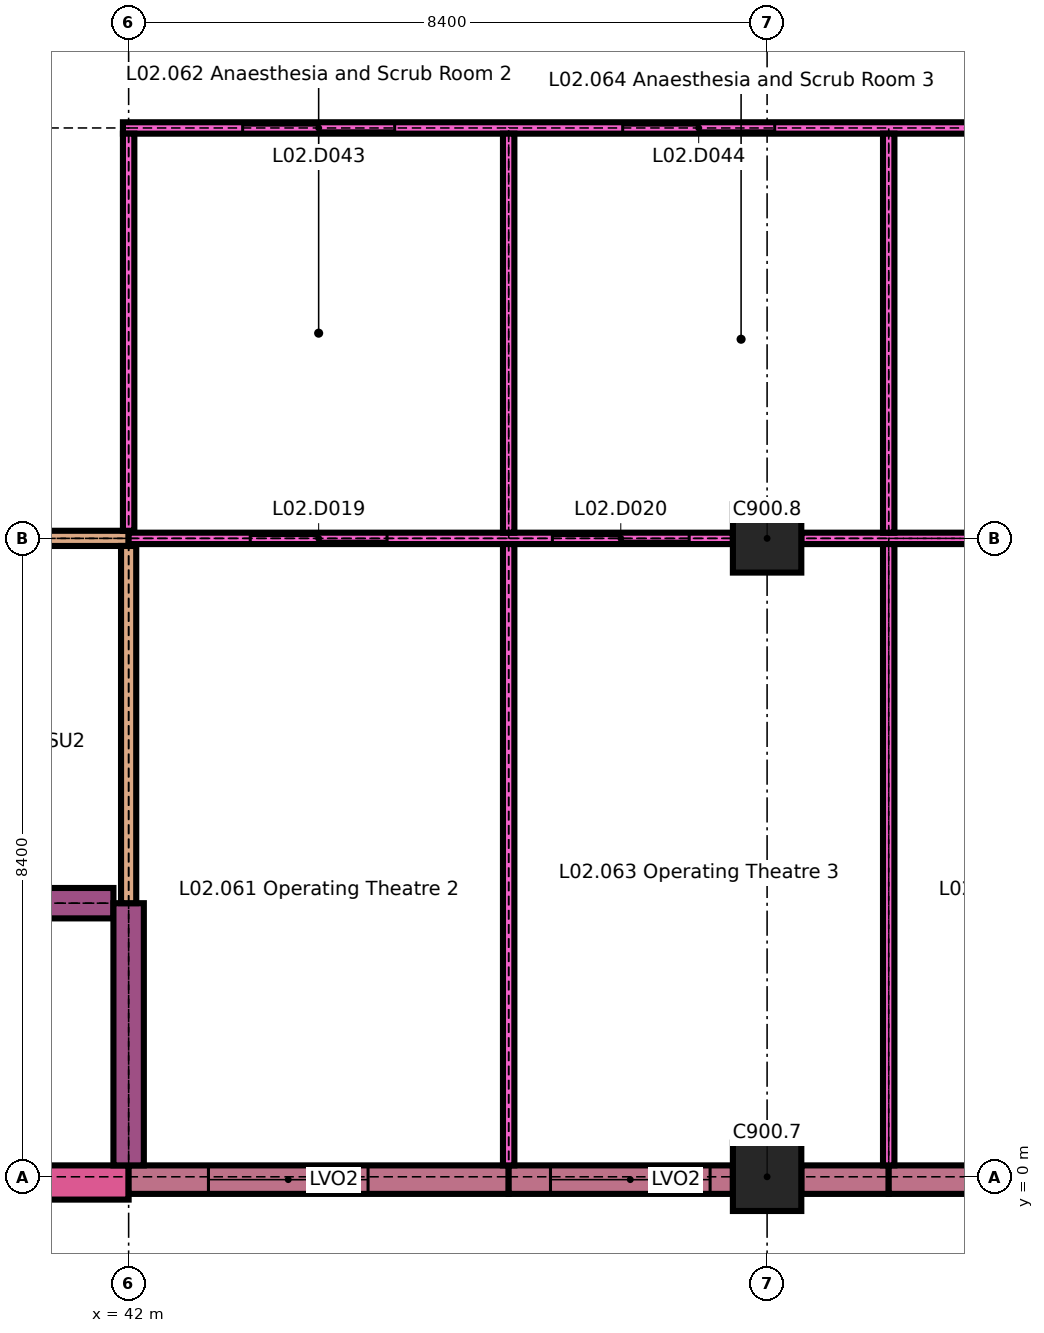
"""IFC4 building model, lengths in metres.
Left out: names, types, materials, properties, quantities, classifications, styles, units other than length and angle.
Written with IfcOpenShell. Run it as: python <this file> out.ifc"""

import sys

from ifc_helpers import new_model, si_unit, direction, frame, frame_2d, origin, origin_2d, place, context, subcontext, project, spatial, rectangle, extrude, element, fill, save


model = new_model("IFC4")
c1 = context("Model", 3, precision=1e-05, world=origin(), true_north=direction((0.0, 1.0)))
c2 = subcontext(c1, "Body", "Model", "MODEL_VIEW")
j1 = project(units=[si_unit("LENGTHUNIT", "METRE"), si_unit("PLANEANGLEUNIT", "RADIAN")], contexts=[c1])
p1 = place(None, origin())
s1 = spatial("IfcSite", under=j1, at=p1, CompositionType="ELEMENT")
p2 = place(p1, origin())
s2 = spatial("IfcBuilding", under=s1, at=p2, CompositionType="ELEMENT")
p3 = place(p2, frame((0.0, 0.0, 8.4)))
s3 = spatial("IfcBuildingStorey", under=s2, at=p3, CompositionType="ELEMENT", Elevation=8.4)
for number, where, z_axis, x_axis in (
    (1, (50.4, 0.0, 0.0), (0.0, 0.0, 1.0), (1.0, 0.0, 0.0)),
    (2, (50.4, 8.4, 0.0), (0.0, 0.0, 1.0), (1.0, 0.0, 0.0)),
):
    element("IfcColumn", number, at=place(p3, frame(where, z_axis=z_axis, x_axis=x_axis)), inside=s3, PredefinedType="COLUMN", context=c2, shape_type="SweptSolid", body=[
        extrude(rectangle(XDim=0.9, YDim=0.9, at=origin_2d()), origin(), (0.0, 0.0, 1.0), 4.2),
    ])
p4 = place(p3, frame((38.15, -0.075, 0.0), z_axis=(0.0, 0.0, 1.0), x_axis=(1.0, 0.0, 0.0)))
e3 = element("IfcWall", 3, at=p4, inside=s3, PredefinedType="SOLIDWALL", context=c2, shape_type="SweptSolid", body=[
    extrude(rectangle(XDim=3.85, YDim=0.45, at=frame_2d((1.925, 0.0))), origin(), (0.0, 0.0, 1.0), 4.2),
])
p5 = place(p3, frame((42.0, -0.038, 0.0), z_axis=(0.0, 0.0, 1.0), x_axis=(1.0, 0.0, 0.0)))
e4 = element("IfcWall", 4, at=p5, inside=s3, PredefinedType="SOLIDWALL", context=c2, shape_type="SweptSolid", body=[
    extrude(rectangle(XDim=5.0, YDim=0.375, at=frame_2d((2.5, 0.0))), origin(), (0.0, 0.0, 1.0), 3.9),
])
p6 = place(p5, frame((1.05, 0.0, 0.9)))
e5 = element("IfcOpeningElement", 5, at=p6, cuts=e4, PredefinedType="OPENING", context=c2, shape_type="SweptSolid", body=[
    extrude(rectangle(XDim=2.1, YDim=2.4, at=frame_2d((1.05, 1.2))), frame((0.0, 0.198, 0.0), z_axis=(0.0, -1.0, 0.0), x_axis=(1.0, 0.0, 0.0)), (0.0, 0.0, 1.0), 0.395),
])
p7 = place(p3, frame((47.0, -0.038, 0.0), z_axis=(0.0, 0.0, 1.0), x_axis=(1.0, 0.0, 0.0)))
e6 = element("IfcWall", 6, at=p7, inside=s3, PredefinedType="SOLIDWALL", context=c2, shape_type="SweptSolid", body=[
    extrude(rectangle(XDim=2.95, YDim=0.375, at=frame_2d((1.475, 0.0))), origin(), (0.0, 0.0, 1.0), 3.9),
])
p8 = place(p7, frame((0.55, 0.0, 0.9)))
e7 = element("IfcOpeningElement", 7, at=p8, cuts=e6, PredefinedType="OPENING", context=c2, shape_type="SweptSolid", body=[
    extrude(rectangle(XDim=2.1, YDim=2.4, at=frame_2d((1.05, 1.2))), frame((0.0, 0.198, 0.0), z_axis=(0.0, -1.0, 0.0), x_axis=(1.0, 0.0, 0.0)), (0.0, 0.0, 1.0), 0.395),
])
p9 = place(p3, frame((50.85, -0.038, 0.0), z_axis=(0.0, 0.0, 1.0), x_axis=(1.0, 0.0, 0.0)))
e8 = element("IfcWall", 8, at=p9, inside=s3, PredefinedType="SOLIDWALL", context=c2, shape_type="SweptSolid", body=[
    extrude(rectangle(XDim=1.15, YDim=0.375, at=frame_2d((0.575, 0.0))), origin(), (0.0, 0.0, 1.0), 3.9),
])
p10 = place(p3, frame((52.0, -0.038, 0.0), z_axis=(0.0, 0.0, 1.0), x_axis=(1.0, 0.0, 0.0)))
e9 = element("IfcWall", 9, at=p10, inside=s3, PredefinedType="SOLIDWALL", context=c2, shape_type="SweptSolid", body=[
    extrude(rectangle(XDim=5.0, YDim=0.375, at=frame_2d((2.5, 0.0))), origin(), (0.0, 0.0, 1.0), 3.9),
])
p11 = place(p10, frame((1.45, 0.0, 0.9)))
e10 = element("IfcOpeningElement", 10, at=p11, cuts=e9, PredefinedType="OPENING", context=c2, shape_type="SweptSolid", body=[
    extrude(rectangle(XDim=2.1, YDim=2.4, at=frame_2d((1.05, 1.2))), frame((0.0, 0.198, 0.0), z_axis=(0.0, -1.0, 0.0), x_axis=(1.0, 0.0, 0.0)), (0.0, 0.0, 1.0), 0.395),
])
p12 = place(p3, frame((33.8, 3.6, 0.0), z_axis=(0.0, 0.0, 1.0), x_axis=(1.0, 0.0, 0.0)))
e11 = element("IfcWall", 11, at=p12, inside=s3, PredefinedType="SHEAR", context=c2, shape_type="SweptSolid", body=[
    extrude(rectangle(XDim=8.0, YDim=0.4, at=frame_2d((4.0, 0.0))), origin(), (0.0, 0.0, 1.0), 4.2),
])
p13 = place(p12, frame((0.4, 0.0, 0.0)))
e12 = element("IfcOpeningElement", 12, at=p13, cuts=e11, PredefinedType="OPENING", context=c2, shape_type="SweptSolid", body=[
    extrude(rectangle(XDim=1.2, YDim=2.1, at=frame_2d((0.6, 1.05))), frame((0.0, 0.21, 0.0), z_axis=(0.0, -1.0, 0.0), x_axis=(1.0, 0.0, 0.0)), (0.0, 0.0, 1.0), 0.42),
])
p14 = place(p3, frame((33.7, 8.4, 0.0), z_axis=(0.0, 0.0, 1.0), x_axis=(1.0, 0.0, 0.0)))
e13 = element("IfcWall", 13, at=p14, inside=s3, PredefinedType="PARTITIONING", context=c2, shape_type="SweptSolid", body=[
    extrude(rectangle(XDim=8.3, YDim=0.2, at=frame_2d((4.15, 0.0))), origin(), (0.0, 0.0, 1.0), 4.2),
])
p15 = place(p14, frame((3.45, 0.0, 0.0)))
e14 = element("IfcOpeningElement", 14, at=p15, cuts=e13, PredefinedType="OPENING", context=c2, shape_type="SweptSolid", body=[
    extrude(rectangle(XDim=1.4, YDim=2.1, at=frame_2d((0.7, 1.05))), frame((0.0, 0.11, 0.0), z_axis=(0.0, -1.0, 0.0), x_axis=(1.0, 0.0, 0.0)), (0.0, 0.0, 1.0), 0.22),
])
p16 = place(p3, frame((42.0, 8.4, 0.0), z_axis=(0.0, 0.0, 1.0), x_axis=(1.0, 0.0, 0.0)))
e15 = element("IfcWall", 15, at=p16, inside=s3, PredefinedType="PARTITIONING", context=c2, shape_type="SweptSolid", body=[
    extrude(rectangle(XDim=7.95, YDim=0.15, at=frame_2d((3.975, 0.0))), origin(), (0.0, 0.0, 1.0), 4.2),
])
p17 = place(p16, frame((1.6, 0.0, 0.0)))
e16 = element("IfcOpeningElement", 16, at=p17, cuts=e15, PredefinedType="OPENING", context=c2, shape_type="SweptSolid", body=[
    extrude(rectangle(XDim=1.8, YDim=2.4, at=frame_2d((0.9, 1.2))), frame((0.0, 0.085, 0.0), z_axis=(0.0, -1.0, 0.0), x_axis=(1.0, 0.0, 0.0)), (0.0, 0.0, 1.0), 0.17),
])
p18 = place(p16, frame((5.575, 0.0, 0.0)))
e17 = element("IfcOpeningElement", 17, at=p18, cuts=e15, PredefinedType="OPENING", context=c2, shape_type="SweptSolid", body=[
    extrude(rectangle(XDim=1.8, YDim=2.4, at=frame_2d((0.9, 1.2))), frame((0.0, 0.085, 0.0), z_axis=(0.0, -1.0, 0.0), x_axis=(1.0, 0.0, 0.0)), (0.0, 0.0, 1.0), 0.17),
])
p19 = place(p3, frame((50.85, 8.4, 0.0), z_axis=(0.0, 0.0, 1.0), x_axis=(1.0, 0.0, 0.0)))
e18 = element("IfcWall", 18, at=p19, inside=s3, PredefinedType="PARTITIONING", context=c2, shape_type="SweptSolid", body=[
    extrude(rectangle(XDim=7.5, YDim=0.15, at=frame_2d((3.75, 0.0))), origin(), (0.0, 0.0, 1.0), 4.2),
])
p20 = place(p19, frame((2.75, 0.0, 0.0)))
e19 = element("IfcOpeningElement", 19, at=p20, cuts=e18, PredefinedType="OPENING", context=c2, shape_type="SweptSolid", body=[
    extrude(rectangle(XDim=1.8, YDim=2.4, at=frame_2d((0.9, 1.2))), frame((0.0, 0.085, 0.0), z_axis=(0.0, -1.0, 0.0), x_axis=(1.0, 0.0, 0.0)), (0.0, 0.0, 1.0), 0.17),
])
p21 = place(p3, frame((41.925, 13.8, 0.0), z_axis=(0.0, 0.0, 1.0), x_axis=(1.0, 0.0, 0.0)))
e20 = element("IfcWall", 20, at=p21, inside=s3, PredefinedType="PARTITIONING", context=c2, shape_type="SweptSolid", body=[
    extrude(rectangle(XDim=25.35, YDim=0.15, at=frame_2d((12.675, 0.0))), origin(), (0.0, 0.0, 1.0), 4.2),
])
p22 = place(p21, frame((1.575, 0.0, 0.0)))
e21 = element("IfcOpeningElement", 21, at=p22, cuts=e20, PredefinedType="OPENING", context=c2, shape_type="SweptSolid", body=[
    extrude(rectangle(XDim=2.0, YDim=2.4, at=frame_2d((1.0, 1.2))), frame((0.0, 0.085, 0.0), z_axis=(0.0, -1.0, 0.0), x_axis=(1.0, 0.0, 0.0)), (0.0, 0.0, 1.0), 0.17),
])
p23 = place(p21, frame((6.575, 0.0, 0.0)))
e22 = element("IfcOpeningElement", 22, at=p23, cuts=e20, PredefinedType="OPENING", context=c2, shape_type="SweptSolid", body=[
    extrude(rectangle(XDim=2.0, YDim=2.4, at=frame_2d((1.0, 1.2))), frame((0.0, 0.085, 0.0), z_axis=(0.0, -1.0, 0.0), x_axis=(1.0, 0.0, 0.0)), (0.0, 0.0, 1.0), 0.17),
])
p24 = place(p21, frame((11.575, 0.0, 0.0)))
e23 = element("IfcOpeningElement", 23, at=p24, cuts=e20, PredefinedType="OPENING", context=c2, shape_type="SweptSolid", body=[
    extrude(rectangle(XDim=2.0, YDim=2.4, at=frame_2d((1.0, 1.2))), frame((0.0, 0.085, 0.0), z_axis=(0.0, -1.0, 0.0), x_axis=(1.0, 0.0, 0.0)), (0.0, 0.0, 1.0), 0.17),
])
p25 = place(p21, frame((16.575, 0.0, 0.0)))
e24 = element("IfcOpeningElement", 24, at=p25, cuts=e20, PredefinedType="OPENING", context=c2, shape_type="SweptSolid", body=[
    extrude(rectangle(XDim=2.0, YDim=2.4, at=frame_2d((1.0, 1.2))), frame((0.0, 0.085, 0.0), z_axis=(0.0, -1.0, 0.0), x_axis=(1.0, 0.0, 0.0)), (0.0, 0.0, 1.0), 0.17),
])
p26 = place(p21, frame((21.675, 0.0, 0.0)))
e25 = element("IfcOpeningElement", 25, at=p26, cuts=e20, PredefinedType="OPENING", context=c2, shape_type="SweptSolid", body=[
    extrude(rectangle(XDim=2.0, YDim=2.4, at=frame_2d((1.0, 1.2))), frame((0.0, 0.085, 0.0), z_axis=(0.0, -1.0, 0.0), x_axis=(1.0, 0.0, 0.0)), (0.0, 0.0, 1.0), 0.17),
])
p27 = place(p3, frame((42.0, 0.15, 0.0), z_axis=(0.0, 0.0, 1.0), x_axis=(0.0, 1.0, 0.0)))
e26 = element("IfcWall", 26, at=p27, inside=s3, PredefinedType="SHEAR", context=c2, shape_type="SweptSolid", body=[
    extrude(rectangle(XDim=3.45, YDim=0.4, at=frame_2d((1.725, 0.0))), origin(), (0.0, 0.0, 1.0), 4.2),
])
p28 = place(p3, frame((42.0, 3.6, 0.0), z_axis=(0.0, 0.0, 1.0), x_axis=(0.0, 1.0, 0.0)))
e27 = element("IfcWall", 27, at=p28, inside=s3, PredefinedType="PARTITIONING", context=c2, shape_type="SweptSolid", body=[
    extrude(rectangle(XDim=4.7, YDim=0.2, at=frame_2d((2.35, 0.0))), origin(), (0.0, 0.0, 1.0), 4.2),
])
p29 = place(p3, frame((42.0, 8.5, 0.0), z_axis=(0.0, 0.0, 1.0), x_axis=(0.0, 1.0, 0.0)))
e28 = element("IfcWall", 28, at=p29, inside=s3, PredefinedType="PARTITIONING", context=c2, shape_type="SweptSolid", body=[
    extrude(rectangle(XDim=5.225, YDim=0.15, at=frame_2d((2.613, 0.0))), origin(), (0.0, 0.0, 1.0), 4.2),
])
p30 = place(p3, frame((47.0, 0.15, 0.0), z_axis=(0.0, 0.0, 1.0), x_axis=(0.0, 1.0, 0.0)))
e29 = element("IfcWall", 29, at=p30, inside=s3, PredefinedType="PARTITIONING", context=c2, shape_type="SweptSolid", body=[
    extrude(rectangle(XDim=8.175, YDim=0.15, at=frame_2d((4.087, 0.0))), origin(), (0.0, 0.0, 1.0), 4.2),
])
p31 = place(p3, frame((47.0, 8.475, 0.0), z_axis=(0.0, 0.0, 1.0), x_axis=(0.0, 1.0, 0.0)))
e30 = element("IfcWall", 30, at=p31, inside=s3, PredefinedType="PARTITIONING", context=c2, shape_type="SweptSolid", body=[
    extrude(rectangle(XDim=5.25, YDim=0.15, at=frame_2d((2.625, 0.0))), origin(), (0.0, 0.0, 1.0), 4.2),
])
p32 = place(p3, frame((52.0, 0.15, 0.0), z_axis=(0.0, 0.0, 1.0), x_axis=(0.0, 1.0, 0.0)))
e31 = element("IfcWall", 31, at=p32, inside=s3, PredefinedType="PARTITIONING", context=c2, shape_type="SweptSolid", body=[
    extrude(rectangle(XDim=8.175, YDim=0.15, at=frame_2d((4.087, 0.0))), origin(), (0.0, 0.0, 1.0), 4.2),
])
p33 = place(p3, frame((52.0, 8.475, 0.0), z_axis=(0.0, 0.0, 1.0), x_axis=(0.0, 1.0, 0.0)))
e32 = element("IfcWall", 32, at=p33, inside=s3, PredefinedType="PARTITIONING", context=c2, shape_type="SweptSolid", body=[
    extrude(rectangle(XDim=5.25, YDim=0.15, at=frame_2d((2.625, 0.0))), origin(), (0.0, 0.0, 1.0), 4.2),
])
p34 = place(p6, origin())
e33 = element("IfcWindow", 33, at=p34, inside=s3, PartitioningType="SINGLE_PANEL", PredefinedType="WINDOW", context=c2, shape_type="SweptSolid", body=[
    extrude(rectangle(XDim=2.1, YDim=2.4, at=frame_2d((1.05, 1.2))), frame((0.0, 0.075, 0.0), z_axis=(0.0, -1.0, 0.0), x_axis=(1.0, 0.0, 0.0)), (0.0, 0.0, 1.0), 0.15),
])
fill(e5, e33)
p35 = place(p8, origin())
e34 = element("IfcWindow", 34, at=p35, inside=s3, PartitioningType="SINGLE_PANEL", PredefinedType="WINDOW", context=c2, shape_type="SweptSolid", body=[
    extrude(rectangle(XDim=2.1, YDim=2.4, at=frame_2d((1.05, 1.2))), frame((0.0, 0.075, 0.0), z_axis=(0.0, -1.0, 0.0), x_axis=(1.0, 0.0, 0.0)), (0.0, 0.0, 1.0), 0.15),
])
fill(e7, e34)
p36 = place(p17, origin())
e35 = element("IfcDoor", 35, at=p36, inside=s3, OperationType="DOUBLE_DOOR_SLIDING", PredefinedType="DOOR", context=c2, shape_type="SweptSolid", body=[
    extrude(rectangle(XDim=1.8, YDim=2.4, at=frame_2d((0.9, 1.2))), frame((0.0, 0.045, 0.0), z_axis=(0.0, -1.0, 0.0), x_axis=(1.0, 0.0, 0.0)), (0.0, 0.0, 1.0), 0.09),
])
fill(e16, e35)
p37 = place(p18, origin())
e36 = element("IfcDoor", 36, at=p37, inside=s3, OperationType="DOUBLE_DOOR_SLIDING", PredefinedType="DOOR", context=c2, shape_type="SweptSolid", body=[
    extrude(rectangle(XDim=1.8, YDim=2.4, at=frame_2d((0.9, 1.2))), frame((0.0, 0.045, 0.0), z_axis=(0.0, -1.0, 0.0), x_axis=(1.0, 0.0, 0.0)), (0.0, 0.0, 1.0), 0.09),
])
fill(e17, e36)
p38 = place(p22, origin())
e37 = element("IfcDoor", 37, at=p38, inside=s3, OperationType="DOUBLE_DOOR_SLIDING", PredefinedType="DOOR", context=c2, shape_type="SweptSolid", body=[
    extrude(rectangle(XDim=2.0, YDim=2.4, at=frame_2d((1.0, 1.2))), frame((0.0, 0.045, 0.0), z_axis=(0.0, -1.0, 0.0), x_axis=(1.0, 0.0, 0.0)), (0.0, 0.0, 1.0), 0.09),
])
fill(e21, e37)
p39 = place(p23, origin())
e38 = element("IfcDoor", 38, at=p39, inside=s3, OperationType="DOUBLE_DOOR_SLIDING", PredefinedType="DOOR", context=c2, shape_type="SweptSolid", body=[
    extrude(rectangle(XDim=2.0, YDim=2.4, at=frame_2d((1.0, 1.2))), frame((0.0, 0.045, 0.0), z_axis=(0.0, -1.0, 0.0), x_axis=(1.0, 0.0, 0.0)), (0.0, 0.0, 1.0), 0.09),
])
fill(e22, e38)
save(model, sys.argv[1])
